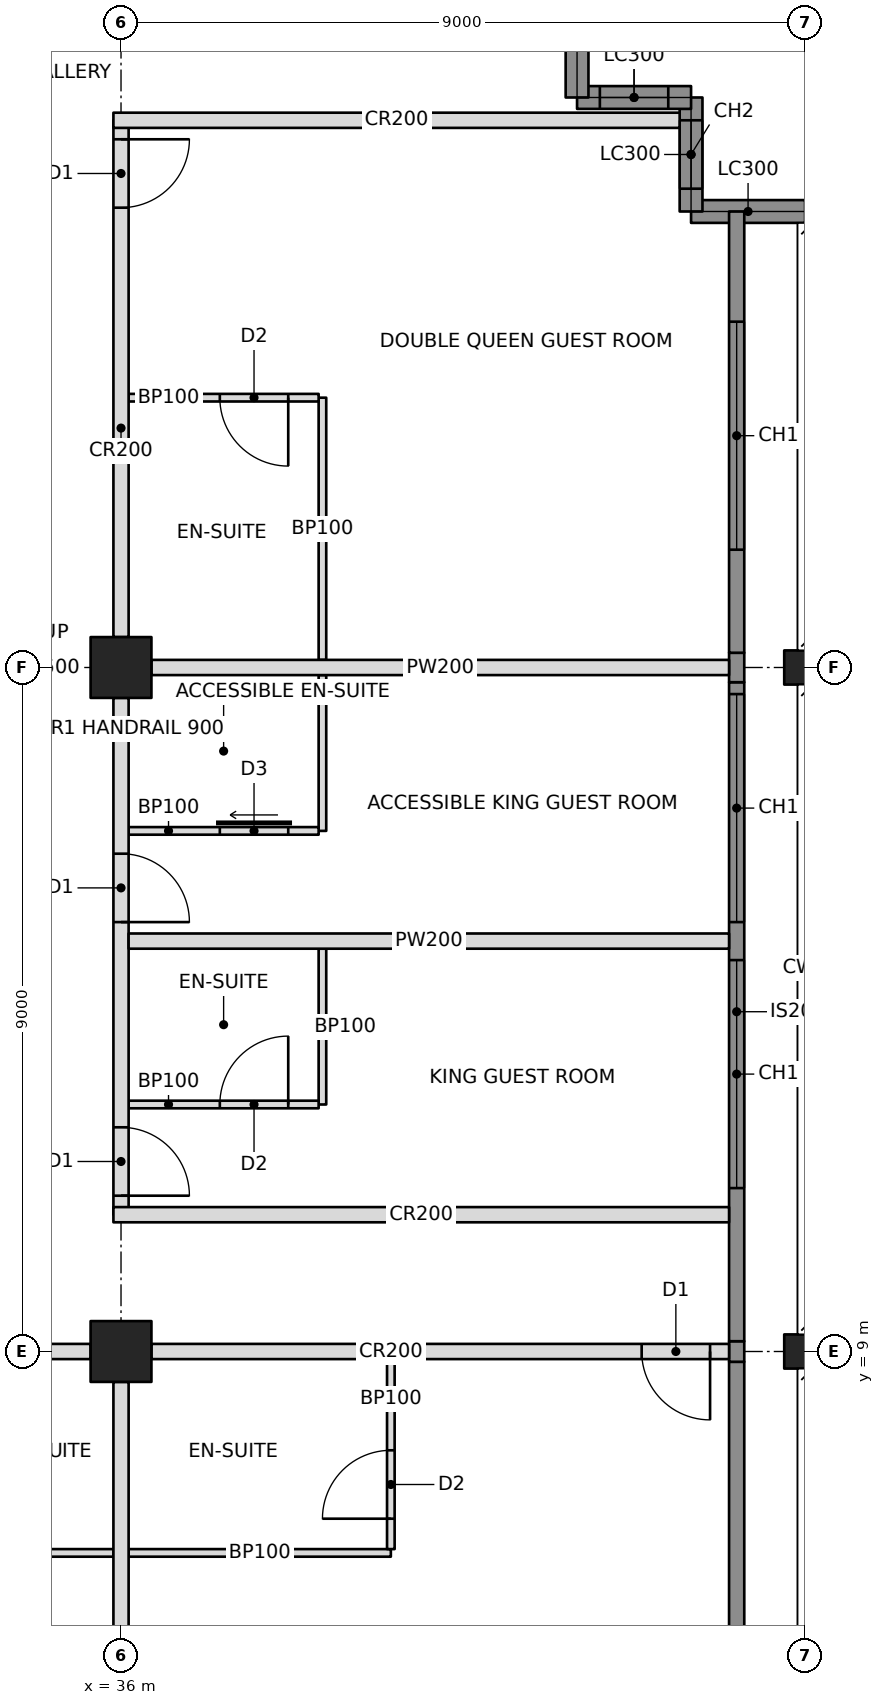
"""IFC4 building model, lengths in metres.
Left out: names, types, materials, properties, quantities, classifications, styles, units other than length and angle.
Written with IfcOpenShell. Run it as: python <this file> out.ifc"""

import sys

from ifc_helpers import new_model, si_unit, direction, frame, frame_2d, origin, origin_2d, place, context, subcontext, project, spatial, rectangle, hollow_rectangle, i_section, extrude, element, fill, save


model = new_model("IFC4")
c1 = context("Model", 3, precision=1e-05, world=origin(), true_north=direction((0.0, 1.0)))
c2 = subcontext(c1, "Body", "Model", "MODEL_VIEW")
j1 = project(units=[si_unit("LENGTHUNIT", "METRE"), si_unit("PLANEANGLEUNIT", "RADIAN")], contexts=[c1])
p1 = place(None, origin())
s1 = spatial("IfcSite", under=j1, at=p1, CompositionType="ELEMENT")
p2 = place(p1, origin())
s2 = spatial("IfcBuilding", under=s1, at=p2, CompositionType="ELEMENT")
p3 = place(p2, frame((0.0, 0.0, 170.6)))
s3 = spatial("IfcBuildingStorey", under=s2, at=p3, CompositionType="ELEMENT", Elevation=170.6)
for number, where, z_axis, x_axis in (
    (1, (36.0, 9.0, 0.0), (0.0, 0.0, 1.0), (0.0, 1.0, 0.0)),
    (2, (36.0, 18.0, 0.0), (0.0, 0.0, 1.0), (0.0, 1.0, 0.0)),
):
    element("IfcColumn", number, at=place(p3, frame(where, z_axis=z_axis, x_axis=x_axis)), inside=s3, PredefinedType="COLUMN", context=c2, shape_type="SweptSolid", body=[
        extrude(hollow_rectangle(XDim=0.8, YDim=0.8, WallThickness=0.06, at=origin_2d()), origin(), (0.0, 0.0, 1.0), 3.4),
    ])
for number, where, z_axis, x_axis in (
    (3, (45.0, 9.0, 0.0), (0.0, 0.0, 1.0), (0.0, 1.0, 0.0)),
    (4, (45.0, 18.0, 0.0), (0.0, 0.0, 1.0), (0.0, 1.0, 0.0)),
):
    element("IfcColumn", number, at=place(p3, frame(where, z_axis=z_axis, x_axis=x_axis)), inside=s3, PredefinedType="COLUMN", context=c2, shape_type="SweptSolid", body=[
        extrude(i_section(OverallWidth=0.449, OverallDepth=0.549, WebThickness=0.072, FlangeThickness=0.115, at=origin_2d()), origin(), (0.0, 0.0, 1.0), 3.4),
    ])
p4 = place(p3, frame((45.0, 24.0, 0.0), z_axis=(0.0, 0.0, 1.0), x_axis=(-1.0, 0.0, 0.0)))
e5 = element("IfcWall", 5, at=p4, inside=s3, PredefinedType="SOLIDWALL", context=c2, shape_type="SweptSolid", body=[
    extrude(rectangle(XDim=1.5, YDim=0.3, at=frame_2d((0.75, 0.0))), origin(), (0.0, 0.0, 1.0), 2.42),
])
p5 = place(p3, frame((43.5, 24.0, 0.0), z_axis=(0.0, 0.0, 1.0), x_axis=(0.0, 1.0, 0.0)))
e6 = element("IfcWall", 6, at=p5, inside=s3, PredefinedType="SOLIDWALL", context=c2, shape_type="SweptSolid", body=[
    extrude(rectangle(XDim=1.5, YDim=0.3, at=frame_2d((0.75, 0.0))), origin(), (0.0, 0.0, 1.0), 3.2),
])
p6 = place(p5, frame((0.3, 0.0, 0.6)))
e7 = element("IfcOpeningElement", 7, at=p6, cuts=e6, PredefinedType="OPENING", context=c2, shape_type="SweptSolid", body=[
    extrude(rectangle(XDim=0.9, YDim=2.2, at=frame_2d((0.45, 1.1))), frame((0.0, 0.16, 0.0), z_axis=(0.0, -1.0, 0.0), x_axis=(1.0, 0.0, 0.0)), (0.0, 0.0, 1.0), 0.32),
])
p7 = place(p3, frame((43.5, 25.5, 0.0), z_axis=(0.0, 0.0, 1.0), x_axis=(-1.0, 0.0, 0.0)))
e8 = element("IfcWall", 8, at=p7, inside=s3, PredefinedType="SOLIDWALL", context=c2, shape_type="SweptSolid", body=[
    extrude(rectangle(XDim=1.5, YDim=0.3, at=frame_2d((0.75, 0.0))), origin(), (0.0, 0.0, 1.0), 3.2),
])
p8 = place(p7, frame((0.3, 0.0, 0.6)))
e9 = element("IfcOpeningElement", 9, at=p8, cuts=e8, PredefinedType="OPENING", context=c2, shape_type="SweptSolid", body=[
    extrude(rectangle(XDim=0.9, YDim=2.2, at=frame_2d((0.45, 1.1))), frame((0.0, 0.16, 0.0), z_axis=(0.0, -1.0, 0.0), x_axis=(1.0, 0.0, 0.0)), (0.0, 0.0, 1.0), 0.32),
])
p9 = place(p3, frame((42.0, 25.5, 0.0), z_axis=(0.0, 0.0, 1.0), x_axis=(0.0, 1.0, 0.0)))
e10 = element("IfcWall", 10, at=p9, inside=s3, PredefinedType="SOLIDWALL", context=c2, shape_type="SweptSolid", body=[
    extrude(rectangle(XDim=1.5, YDim=0.3, at=frame_2d((0.75, 0.0))), origin(), (0.0, 0.0, 1.0), 2.42),
])
p10 = place(p3, frame((31.6, 9.0, 0.0), z_axis=(0.0, 0.0, 1.0), x_axis=(1.0, 0.0, 0.0)))
e11 = element("IfcWall", 11, at=p10, inside=s3, PredefinedType="PARTITIONING", context=c2, shape_type="SweptSolid", body=[
    extrude(rectangle(XDim=4.0, YDim=0.2, at=frame_2d((2.0, 0.0))), origin(), (0.0, 0.0, 1.0), 2.405),
])
p11 = place(p10, frame((0.15, 0.0, 0.0)))
e12 = element("IfcOpeningElement", 12, at=p11, cuts=e11, PredefinedType="OPENING", context=c2, shape_type="SweptSolid", body=[
    extrude(rectangle(XDim=0.9, YDim=2.1, at=frame_2d((0.45, 1.05))), frame((0.0, 0.11, 0.0), z_axis=(0.0, -1.0, 0.0), x_axis=(1.0, 0.0, 0.0)), (0.0, 0.0, 1.0), 0.22),
])
p12 = place(p3, frame((36.4, 9.0, 0.0), z_axis=(0.0, 0.0, 1.0), x_axis=(1.0, 0.0, 0.0)))
e13 = element("IfcWall", 13, at=p12, inside=s3, PredefinedType="PARTITIONING", context=c2, shape_type="SweptSolid", body=[
    extrude(rectangle(XDim=7.6, YDim=0.2, at=frame_2d((3.8, 0.0))), origin(), (0.0, 0.0, 1.0), 2.438),
])
p13 = place(p12, frame((6.45, 0.0, 0.0)))
e14 = element("IfcOpeningElement", 14, at=p13, cuts=e13, PredefinedType="OPENING", context=c2, shape_type="SweptSolid", body=[
    extrude(rectangle(XDim=0.9, YDim=2.1, at=frame_2d((0.45, 1.05))), frame((0.0, 0.11, 0.0), z_axis=(0.0, -1.0, 0.0), x_axis=(1.0, 0.0, 0.0)), (0.0, 0.0, 1.0), 0.22),
])
p14 = place(p3, frame((36.0, 10.8, 0.0), z_axis=(0.0, 0.0, 1.0), x_axis=(0.0, 1.0, 0.0)))
e15 = element("IfcWall", 15, at=p14, inside=s3, PredefinedType="PARTITIONING", context=c2, shape_type="SweptSolid", body=[
    extrude(rectangle(XDim=6.8, YDim=0.2, at=frame_2d((3.4, 0.0))), origin(), (0.0, 0.0, 1.0), 2.405),
])
p15 = place(p14, frame((0.25, 0.0, 0.0)))
e16 = element("IfcOpeningElement", 16, at=p15, cuts=e15, PredefinedType="OPENING", context=c2, shape_type="SweptSolid", body=[
    extrude(rectangle(XDim=0.9, YDim=2.1, at=frame_2d((0.45, 1.05))), frame((0.0, 0.11, 0.0), z_axis=(0.0, -1.0, 0.0), x_axis=(1.0, 0.0, 0.0)), (0.0, 0.0, 1.0), 0.22),
])
p16 = place(p14, frame((3.85, 0.0, 0.0)))
e17 = element("IfcOpeningElement", 17, at=p16, cuts=e15, PredefinedType="OPENING", context=c2, shape_type="SweptSolid", body=[
    extrude(rectangle(XDim=0.9, YDim=2.1, at=frame_2d((0.45, 1.05))), frame((0.0, 0.11, 0.0), z_axis=(0.0, -1.0, 0.0), x_axis=(1.0, 0.0, 0.0)), (0.0, 0.0, 1.0), 0.22),
])
p17 = place(p3, frame((36.0, 18.4, 0.0), z_axis=(0.0, 0.0, 1.0), x_axis=(0.0, 1.0, 0.0)))
e18 = element("IfcWall", 18, at=p17, inside=s3, PredefinedType="PARTITIONING", context=c2, shape_type="SweptSolid", body=[
    extrude(rectangle(XDim=6.8, YDim=0.2, at=frame_2d((3.4, 0.0))), origin(), (0.0, 0.0, 1.0), 2.405),
])
p18 = place(p17, frame((5.65, 0.0, 0.0)))
e19 = element("IfcOpeningElement", 19, at=p18, cuts=e18, PredefinedType="OPENING", context=c2, shape_type="SweptSolid", body=[
    extrude(rectangle(XDim=0.9, YDim=2.1, at=frame_2d((0.45, 1.05))), frame((0.0, 0.11, 0.0), z_axis=(0.0, -1.0, 0.0), x_axis=(1.0, 0.0, 0.0)), (0.0, 0.0, 1.0), 0.22),
])
p19 = place(p3, frame((35.9, 10.8, 0.0), z_axis=(0.0, 0.0, 1.0), x_axis=(1.0, 0.0, 0.0)))
e20 = element("IfcWall", 20, at=p19, inside=s3, PredefinedType="PARTITIONING", context=c2, shape_type="SweptSolid", body=[
    extrude(rectangle(XDim=8.1, YDim=0.2, at=frame_2d((4.05, 0.0))), origin(), (0.0, 0.0, 1.0), 2.404),
])
p20 = place(p3, frame((35.9, 25.2, 0.0), z_axis=(0.0, 0.0, 1.0), x_axis=(1.0, 0.0, 0.0)))
e21 = element("IfcWall", 21, at=p20, inside=s3, PredefinedType="PARTITIONING", context=c2, shape_type="SweptSolid", body=[
    extrude(rectangle(XDim=7.45, YDim=0.2, at=frame_2d((3.725, 0.0))), origin(), (0.0, 0.0, 1.0), 2.404),
])
p21 = place(p3, frame((36.0, 8.6, 0.0), z_axis=(0.0, 0.0, 1.0), x_axis=(0.0, -1.0, 0.0)))
e22 = element("IfcWall", 22, at=p21, inside=s3, PredefinedType="PARTITIONING", context=c2, shape_type="SweptSolid", body=[
    extrude(rectangle(XDim=7.6, YDim=0.2, at=frame_2d((3.8, 0.0))), origin(), (0.0, 0.0, 1.0), 2.438),
])
p22 = place(p3, frame((32.95, 6.35, 0.0), z_axis=(0.0, 0.0, 1.0), x_axis=(1.0, 0.0, 0.0)))
e23 = element("IfcWall", 23, at=p22, inside=s3, PredefinedType="PARTITIONING", context=c2, shape_type="SweptSolid", body=[
    extrude(rectangle(XDim=2.95, YDim=0.1, at=frame_2d((1.475, 0.0))), origin(), (0.0, 0.0, 1.0), 2.438),
])
p23 = place(p3, frame((36.1, 6.35, 0.0), z_axis=(0.0, 0.0, 1.0), x_axis=(1.0, 0.0, 0.0)))
e24 = element("IfcWall", 24, at=p23, inside=s3, PredefinedType="PARTITIONING", context=c2, shape_type="SweptSolid", body=[
    extrude(rectangle(XDim=3.45, YDim=0.1, at=frame_2d((1.725, 0.0))), origin(), (0.0, 0.0, 1.0), 2.438),
])
p24 = place(p3, frame((39.55, 8.9, 0.0), z_axis=(0.0, 0.0, 1.0), x_axis=(0.0, -1.0, 0.0)))
e25 = element("IfcWall", 25, at=p24, inside=s3, PredefinedType="PARTITIONING", context=c2, shape_type="SweptSolid", body=[
    extrude(rectangle(XDim=2.5, YDim=0.1, at=frame_2d((1.25, 0.0))), origin(), (0.0, 0.0, 1.0), 2.438),
])
p25 = place(p24, frame((1.2, 0.0, 0.0)))
e26 = element("IfcOpeningElement", 26, at=p25, cuts=e25, PredefinedType="OPENING", context=c2, shape_type="SweptSolid", body=[
    extrude(rectangle(XDim=0.9, YDim=2.1, at=frame_2d((0.45, 1.05))), frame((0.0, 0.06, 0.0), z_axis=(0.0, -1.0, 0.0), x_axis=(1.0, 0.0, 0.0)), (0.0, 0.0, 1.0), 0.12),
])
p26 = place(p3, frame((36.1, 14.4, 0.0), z_axis=(0.0, 0.0, 1.0), x_axis=(1.0, 0.0, 0.0)))
e27 = element("IfcWall", 27, at=p26, inside=s3, PredefinedType="PARTITIONING", context=c2, shape_type="SweptSolid", body=[
    extrude(rectangle(XDim=7.9, YDim=0.2, at=frame_2d((3.95, 0.0))), origin(), (0.0, 0.0, 1.0), 2.404),
])
p27 = place(p3, frame((36.4, 18.0, 0.0), z_axis=(0.0, 0.0, 1.0), x_axis=(1.0, 0.0, 0.0)))
e28 = element("IfcWall", 28, at=p27, inside=s3, PredefinedType="PARTITIONING", context=c2, shape_type="SweptSolid", body=[
    extrude(rectangle(XDim=7.6, YDim=0.2, at=frame_2d((3.8, 0.0))), origin(), (0.0, 0.0, 1.0), 2.405),
])
p28 = place(p3, frame((38.65, 12.25, 0.0), z_axis=(0.0, 0.0, 1.0), x_axis=(0.0, 1.0, 0.0)))
e29 = element("IfcWall", 29, at=p28, inside=s3, PredefinedType="PARTITIONING", context=c2, shape_type="SweptSolid", body=[
    extrude(rectangle(XDim=2.05, YDim=0.1, at=frame_2d((1.025, 0.0))), origin(), (0.0, 0.0, 1.0), 3.2),
])
p29 = place(p3, frame((36.1, 12.25, 0.0), z_axis=(0.0, 0.0, 1.0), x_axis=(1.0, 0.0, 0.0)))
e30 = element("IfcWall", 30, at=p29, inside=s3, PredefinedType="PARTITIONING", context=c2, shape_type="SweptSolid", body=[
    extrude(rectangle(XDim=2.5, YDim=0.1, at=frame_2d((1.25, 0.0))), origin(), (0.0, 0.0, 1.0), 2.404),
])
p30 = place(p29, frame((1.2, 0.0, 0.0)))
e31 = element("IfcOpeningElement", 31, at=p30, cuts=e30, PredefinedType="OPENING", context=c2, shape_type="SweptSolid", body=[
    extrude(rectangle(XDim=0.9, YDim=2.1, at=frame_2d((0.45, 1.05))), frame((0.0, 0.06, 0.0), z_axis=(0.0, -1.0, 0.0), x_axis=(1.0, 0.0, 0.0)), (0.0, 0.0, 1.0), 0.12),
])
p31 = place(p3, frame((38.65, 15.85, 0.0), z_axis=(0.0, 0.0, 1.0), x_axis=(0.0, 1.0, 0.0)))
e32 = element("IfcWall", 32, at=p31, inside=s3, PredefinedType="PARTITIONING", context=c2, shape_type="SweptSolid", body=[
    extrude(rectangle(XDim=2.05, YDim=0.1, at=frame_2d((1.025, 0.0))), origin(), (0.0, 0.0, 1.0), 2.404),
])
p32 = place(p3, frame((36.1, 15.85, 0.0), z_axis=(0.0, 0.0, 1.0), x_axis=(1.0, 0.0, 0.0)))
e33 = element("IfcWall", 33, at=p32, inside=s3, PredefinedType="PARTITIONING", context=c2, shape_type="SweptSolid", body=[
    extrude(rectangle(XDim=2.5, YDim=0.1, at=frame_2d((1.25, 0.0))), origin(), (0.0, 0.0, 1.0), 2.404),
])
p33 = place(p32, frame((1.2, 0.0, 0.0)))
e34 = element("IfcOpeningElement", 34, at=p33, cuts=e33, PredefinedType="OPENING", context=c2, shape_type="SweptSolid", body=[
    extrude(rectangle(XDim=0.9, YDim=2.1, at=frame_2d((0.45, 1.05))), frame((0.0, 0.06, 0.0), z_axis=(0.0, -1.0, 0.0), x_axis=(1.0, 0.0, 0.0)), (0.0, 0.0, 1.0), 0.12),
])
p34 = place(p3, frame((38.65, 18.1, 0.0), z_axis=(0.0, 0.0, 1.0), x_axis=(0.0, 1.0, 0.0)))
e35 = element("IfcWall", 35, at=p34, inside=s3, PredefinedType="PARTITIONING", context=c2, shape_type="SweptSolid", body=[
    extrude(rectangle(XDim=3.45, YDim=0.1, at=frame_2d((1.725, 0.0))), origin(), (0.0, 0.0, 1.0), 2.404),
])
p35 = place(p3, frame((36.1, 21.55, 0.0), z_axis=(0.0, 0.0, 1.0), x_axis=(1.0, 0.0, 0.0)))
e36 = element("IfcWall", 36, at=p35, inside=s3, PredefinedType="PARTITIONING", context=c2, shape_type="SweptSolid", body=[
    extrude(rectangle(XDim=2.5, YDim=0.1, at=frame_2d((1.25, 0.0))), origin(), (0.0, 0.0, 1.0), 2.404),
])
p36 = place(p35, frame((1.2, 0.0, 0.0)))
e37 = element("IfcOpeningElement", 37, at=p36, cuts=e36, PredefinedType="OPENING", context=c2, shape_type="SweptSolid", body=[
    extrude(rectangle(XDim=0.9, YDim=2.1, at=frame_2d((0.45, 1.05))), frame((0.0, 0.06, 0.0), z_axis=(0.0, -1.0, 0.0), x_axis=(1.0, 0.0, 0.0)), (0.0, 0.0, 1.0), 0.12),
])
p37 = place(p3, frame((44.1, 4.607, 0.0), z_axis=(0.0, 0.0, 1.0), x_axis=(0.0, 1.0, 0.0)))
e38 = element("IfcWall", 38, at=p37, inside=s3, PredefinedType="SOLIDWALL", context=c2, shape_type="SweptSolid", body=[
    extrude(rectangle(XDim=4.257, YDim=0.2, at=frame_2d((2.129, 0.0))), origin(), (0.0, 0.0, 1.0), 3.2),
])
p38 = place(p3, frame((44.1, 8.865, 0.0), z_axis=(0.0, 0.0, 1.0), x_axis=(0.0, 1.0, 0.0)))
e39 = element("IfcWall", 39, at=p38, inside=s3, PredefinedType="SOLIDWALL", context=c2, shape_type="SweptSolid", body=[
    extrude(rectangle(XDim=0.271, YDim=0.2, at=frame_2d((0.135, 0.0))), origin(), (0.0, 0.0, 1.0), 2.438),
])
p39 = place(p3, frame((44.1, 9.135, 0.0), z_axis=(0.0, 0.0, 1.0), x_axis=(0.0, 1.0, 0.0)))
e40 = element("IfcWall", 40, at=p39, inside=s3, PredefinedType="SOLIDWALL", context=c2, shape_type="SweptSolid", body=[
    extrude(rectangle(XDim=8.671, YDim=0.2, at=frame_2d((4.335, 0.0))), origin(), (0.0, 0.0, 1.0), 3.2),
])
p40 = place(p39, frame((2.015, 0.0, 0.6)))
e41 = element("IfcOpeningElement", 41, at=p40, cuts=e40, PredefinedType="OPENING", context=c2, shape_type="SweptSolid", body=[
    extrude(rectangle(XDim=3.0, YDim=2.2, at=frame_2d((1.5, 1.1))), frame((0.0, 0.11, 0.0), z_axis=(0.0, -1.0, 0.0), x_axis=(1.0, 0.0, 0.0)), (0.0, 0.0, 1.0), 0.22),
])
p41 = place(p39, frame((5.515, 0.0, 0.6)))
e42 = element("IfcOpeningElement", 42, at=p41, cuts=e40, PredefinedType="OPENING", context=c2, shape_type="SweptSolid", body=[
    extrude(rectangle(XDim=3.0, YDim=2.2, at=frame_2d((1.5, 1.1))), frame((0.0, 0.11, 0.0), z_axis=(0.0, -1.0, 0.0), x_axis=(1.0, 0.0, 0.0)), (0.0, 0.0, 1.0), 0.22),
])
p42 = place(p3, frame((44.1, 17.806, 0.0), z_axis=(0.0, 0.0, 1.0), x_axis=(0.0, 1.0, 0.0)))
e43 = element("IfcWall", 43, at=p42, inside=s3, PredefinedType="SOLIDWALL", context=c2, shape_type="SweptSolid", body=[
    extrude(rectangle(XDim=0.388, YDim=0.2, at=frame_2d((0.194, 0.0))), origin(), (0.0, 0.0, 1.0), 2.404),
])
p43 = place(p3, frame((44.1, 18.194, 0.0), z_axis=(0.0, 0.0, 1.0), x_axis=(0.0, 1.0, 0.0)))
e44 = element("IfcWall", 44, at=p43, inside=s3, PredefinedType="SOLIDWALL", context=c2, shape_type="SweptSolid", body=[
    extrude(rectangle(XDim=5.806, YDim=0.2, at=frame_2d((2.903, 0.0))), origin(), (0.0, 0.0, 1.0), 3.2),
])
p44 = place(p43, frame((1.356, 0.0, 0.6)))
e45 = element("IfcOpeningElement", 45, at=p44, cuts=e44, PredefinedType="OPENING", context=c2, shape_type="SweptSolid", body=[
    extrude(rectangle(XDim=3.0, YDim=2.2, at=frame_2d((1.5, 1.1))), frame((0.0, 0.11, 0.0), z_axis=(0.0, -1.0, 0.0), x_axis=(1.0, 0.0, 0.0)), (0.0, 0.0, 1.0), 0.22),
])
p45 = place(p6, origin())
e46 = element("IfcWindow", 46, at=p45, inside=s3, PartitioningType="SINGLE_PANEL", PredefinedType="WINDOW", context=c2, shape_type="SweptSolid", body=[
    extrude(rectangle(XDim=0.9, YDim=2.2, at=frame_2d((0.45, 1.1))), frame((0.0, 0.03, 0.0), z_axis=(0.0, -1.0, 0.0), x_axis=(1.0, 0.0, 0.0)), (0.0, 0.0, 1.0), 0.06),
])
fill(e7, e46)
p46 = place(p8, origin())
e47 = element("IfcWindow", 47, at=p46, inside=s3, PartitioningType="SINGLE_PANEL", PredefinedType="WINDOW", context=c2, shape_type="SweptSolid", body=[
    extrude(rectangle(XDim=0.9, YDim=2.2, at=frame_2d((0.45, 1.1))), frame((0.0, 0.03, 0.0), z_axis=(0.0, -1.0, 0.0), x_axis=(1.0, 0.0, 0.0)), (0.0, 0.0, 1.0), 0.06),
])
fill(e9, e47)
p47 = place(p40, origin())
e48 = element("IfcWindow", 48, at=p47, inside=s3, PartitioningType="TRIPLE_PANEL_VERTICAL", PredefinedType="WINDOW", context=c2, shape_type="SweptSolid", body=[
    extrude(rectangle(XDim=3.0, YDim=2.2, at=frame_2d((1.5, 1.1))), frame((0.0, 0.03, 0.0), z_axis=(0.0, -1.0, 0.0), x_axis=(1.0, 0.0, 0.0)), (0.0, 0.0, 1.0), 0.06),
])
fill(e41, e48)
p48 = place(p41, origin())
e49 = element("IfcWindow", 49, at=p48, inside=s3, PartitioningType="TRIPLE_PANEL_VERTICAL", PredefinedType="WINDOW", context=c2, shape_type="SweptSolid", body=[
    extrude(rectangle(XDim=3.0, YDim=2.2, at=frame_2d((1.5, 1.1))), frame((0.0, 0.03, 0.0), z_axis=(0.0, -1.0, 0.0), x_axis=(1.0, 0.0, 0.0)), (0.0, 0.0, 1.0), 0.06),
])
fill(e42, e49)
p49 = place(p44, origin())
e50 = element("IfcWindow", 50, at=p49, inside=s3, PartitioningType="TRIPLE_PANEL_VERTICAL", PredefinedType="WINDOW", context=c2, shape_type="SweptSolid", body=[
    extrude(rectangle(XDim=3.0, YDim=2.2, at=frame_2d((1.5, 1.1))), frame((0.0, 0.03, 0.0), z_axis=(0.0, -1.0, 0.0), x_axis=(1.0, 0.0, 0.0)), (0.0, 0.0, 1.0), 0.06),
])
fill(e45, e50)
p50 = place(p25, frame((0.9, 0.0, 0.0), z_axis=(0.0, 0.0, 1.0), x_axis=(-1.0, 0.0, 0.0)))
e51 = element("IfcDoor", 51, at=p50, inside=s3, OperationType="SINGLE_SWING_LEFT", PredefinedType="DOOR", context=c2, shape_type="SweptSolid", body=[
    extrude(rectangle(XDim=0.9, YDim=2.1, at=frame_2d((0.45, 1.05))), frame((0.0, 0.025, 0.0), z_axis=(0.0, -1.0, 0.0), x_axis=(1.0, 0.0, 0.0)), (0.0, 0.0, 1.0), 0.05),
])
fill(e26, e51)
p51 = place(p13, frame((0.9, 0.0, 0.0), z_axis=(0.0, 0.0, 1.0), x_axis=(-1.0, 0.0, 0.0)))
e52 = element("IfcDoor", 52, at=p51, inside=s3, OperationType="SINGLE_SWING_LEFT", PredefinedType="DOOR", context=c2, shape_type="SweptSolid", body=[
    extrude(rectangle(XDim=0.9, YDim=2.1, at=frame_2d((0.45, 1.05))), frame((0.0, 0.025, 0.0), z_axis=(0.0, -1.0, 0.0), x_axis=(1.0, 0.0, 0.0)), (0.0, 0.0, 1.0), 0.05),
])
fill(e14, e52)
p52 = place(p30, origin())
e53 = element("IfcDoor", 53, at=p52, inside=s3, OperationType="SINGLE_SWING_RIGHT", PredefinedType="DOOR", context=c2, shape_type="SweptSolid", body=[
    extrude(rectangle(XDim=0.9, YDim=2.1, at=frame_2d((0.45, 1.05))), frame((0.0, 0.025, 0.0), z_axis=(0.0, -1.0, 0.0), x_axis=(1.0, 0.0, 0.0)), (0.0, 0.0, 1.0), 0.05),
])
fill(e31, e53)
p53 = place(p15, frame((0.9, 0.0, 0.0), z_axis=(0.0, 0.0, 1.0), x_axis=(-1.0, 0.0, 0.0)))
e54 = element("IfcDoor", 54, at=p53, inside=s3, OperationType="SINGLE_SWING_RIGHT", PredefinedType="DOOR", context=c2, shape_type="SweptSolid", body=[
    extrude(rectangle(XDim=0.9, YDim=2.1, at=frame_2d((0.45, 1.05))), frame((0.0, 0.025, 0.0), z_axis=(0.0, -1.0, 0.0), x_axis=(1.0, 0.0, 0.0)), (0.0, 0.0, 1.0), 0.05),
])
fill(e16, e54)
p54 = place(p33, origin())
e55 = element("IfcDoor", 55, at=p54, inside=s3, OperationType="SLIDING_TO_LEFT", PredefinedType="DOOR", context=c2, shape_type="SweptSolid", body=[
    extrude(rectangle(XDim=0.9, YDim=2.1, at=frame_2d((0.45, 1.05))), frame((0.0, 0.025, 0.0), z_axis=(0.0, -1.0, 0.0), x_axis=(1.0, 0.0, 0.0)), (0.0, 0.0, 1.0), 0.05),
])
fill(e34, e55)
p55 = place(p16, frame((0.9, 0.0, 0.0), z_axis=(0.0, 0.0, 1.0), x_axis=(-1.0, 0.0, 0.0)))
e56 = element("IfcDoor", 56, at=p55, inside=s3, OperationType="SINGLE_SWING_RIGHT", PredefinedType="DOOR", context=c2, shape_type="SweptSolid", body=[
    extrude(rectangle(XDim=0.9, YDim=2.1, at=frame_2d((0.45, 1.05))), frame((0.0, 0.025, 0.0), z_axis=(0.0, -1.0, 0.0), x_axis=(1.0, 0.0, 0.0)), (0.0, 0.0, 1.0), 0.05),
])
fill(e17, e56)
p56 = place(p36, frame((0.9, 0.0, 0.0), z_axis=(0.0, 0.0, 1.0), x_axis=(-1.0, 0.0, 0.0)))
e57 = element("IfcDoor", 57, at=p56, inside=s3, OperationType="SINGLE_SWING_LEFT", PredefinedType="DOOR", context=c2, shape_type="SweptSolid", body=[
    extrude(rectangle(XDim=0.9, YDim=2.1, at=frame_2d((0.45, 1.05))), frame((0.0, 0.025, 0.0), z_axis=(0.0, -1.0, 0.0), x_axis=(1.0, 0.0, 0.0)), (0.0, 0.0, 1.0), 0.05),
])
fill(e37, e57)
p57 = place(p18, frame((0.9, 0.0, 0.0), z_axis=(0.0, 0.0, 1.0), x_axis=(-1.0, 0.0, 0.0)))
e58 = element("IfcDoor", 58, at=p57, inside=s3, OperationType="SINGLE_SWING_LEFT", PredefinedType="DOOR", context=c2, shape_type="SweptSolid", body=[
    extrude(rectangle(XDim=0.9, YDim=2.1, at=frame_2d((0.45, 1.05))), frame((0.0, 0.025, 0.0), z_axis=(0.0, -1.0, 0.0), x_axis=(1.0, 0.0, 0.0)), (0.0, 0.0, 1.0), 0.05),
])
fill(e19, e58)
save(model, sys.argv[1])
